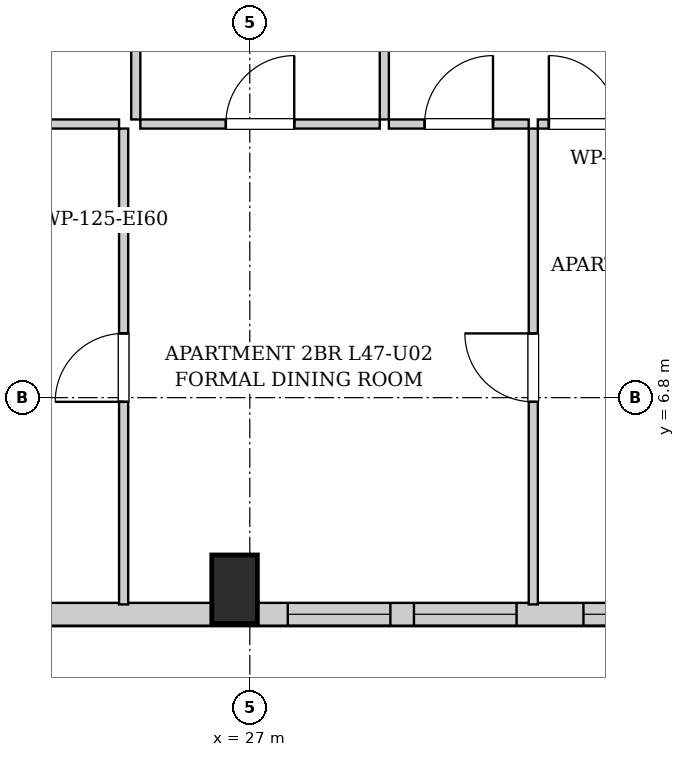
"""IFC4 building model, lengths in metres.
Left out: names, types, materials, properties, quantities, classifications, styles, units other than length and angle.
Written with IfcOpenShell. Run it as: python <this file> out.ifc"""

import sys

from ifc_helpers import new_model, si_unit, direction, frame, frame_2d, origin, origin_2d, place, context, subcontext, project, spatial, rectangle, extrude, element, fill, save


model = new_model("IFC4")
c1 = context("Model", 3, precision=1e-05, world=origin(), true_north=direction((0.0, 1.0)))
c2 = subcontext(c1, "Body", "Model", "MODEL_VIEW")
j1 = project(units=[si_unit("LENGTHUNIT", "METRE"), si_unit("PLANEANGLEUNIT", "RADIAN")], contexts=[c1])
p1 = place(None, origin())
s1 = spatial("IfcSite", under=j1, at=p1, CompositionType="ELEMENT")
p2 = place(p1, origin())
s2 = spatial("IfcBuilding", under=s1, at=p2, CompositionType="ELEMENT")
p3 = place(p2, frame((0.0, 0.0, 163.4)))
s3 = spatial("IfcBuildingStorey", under=s2, at=p3, CompositionType="ELEMENT", Elevation=163.4)
p4 = place(p3, frame((26.8, 4.28, 0.0), z_axis=(0.0, 0.0, 1.0), x_axis=(1.0, 0.0, 0.0)))
e1 = element("IfcColumn", 1, at=p4, inside=s3, PredefinedType="COLUMN", context=c2, shape_type="SweptSolid", body=[
    extrude(rectangle(XDim=0.6, YDim=0.9, at=origin_2d()), origin(), (0.0, 0.0, 1.0), 3.25),
])
p5 = place(p3, frame((37.8, 3.95, 0.0), z_axis=(0.0, 0.0, 1.0), x_axis=(-1.0, 0.0, 0.0)))
e2 = element("IfcWall", 2, at=p5, inside=s3, PredefinedType="SOLIDWALL", context=c2, shape_type="SweptSolid", body=[
    extrude(rectangle(XDim=20.15, YDim=0.3, at=frame_2d((10.075, 0.0))), origin(), (0.0, 0.0, 1.0), 2.99),
])
p6 = place(p5, frame((15.3, 0.0, 0.55)))
e3 = element("IfcOpeningElement", 3, at=p6, cuts=e2, PredefinedType="OPENING", context=c2, shape_type="SweptSolid", body=[
    extrude(rectangle(XDim=1.35, YDim=1.2, at=frame_2d((0.675, 0.6))), frame((0.0, 0.16, 0.0), z_axis=(0.0, -1.0, 0.0), x_axis=(1.0, 0.0, 0.0)), (0.0, 0.0, 1.0), 0.32),
])
p7 = place(p5, frame((16.91, 0.0, 0.55)))
e4 = element("IfcOpeningElement", 4, at=p7, cuts=e2, PredefinedType="OPENING", context=c2, shape_type="SweptSolid", body=[
    extrude(rectangle(XDim=1.35, YDim=1.2, at=frame_2d((0.675, 0.6))), frame((0.0, 0.16, 0.0), z_axis=(0.0, -1.0, 0.0), x_axis=(1.0, 0.0, 0.0)), (0.0, 0.0, 1.0), 0.32),
])
p8 = place(p5, frame((8.95, 0.0, 0.55)))
e5 = element("IfcOpeningElement", 5, at=p8, cuts=e2, PredefinedType="OPENING", context=c2, shape_type="SweptSolid", body=[
    extrude(rectangle(XDim=1.35, YDim=1.2, at=frame_2d((0.675, 0.6))), frame((0.0, 0.16, 0.0), z_axis=(0.0, -1.0, 0.0), x_axis=(1.0, 0.0, 0.0)), (0.0, 0.0, 1.0), 0.32),
])
p9 = place(p5, frame((7.29, 0.0, 0.55)))
e6 = element("IfcOpeningElement", 6, at=p9, cuts=e2, PredefinedType="OPENING", context=c2, shape_type="SweptSolid", body=[
    extrude(rectangle(XDim=1.35, YDim=1.2, at=frame_2d((0.675, 0.6))), frame((0.0, 0.16, 0.0), z_axis=(0.0, -1.0, 0.0), x_axis=(1.0, 0.0, 0.0)), (0.0, 0.0, 1.0), 0.32),
])
p10 = place(p5, frame((5.06, 0.0, 0.55)))
e7 = element("IfcOpeningElement", 7, at=p10, cuts=e2, PredefinedType="OPENING", context=c2, shape_type="SweptSolid", body=[
    extrude(rectangle(XDim=1.35, YDim=1.2, at=frame_2d((0.675, 0.6))), frame((0.0, 0.16, 0.0), z_axis=(0.0, -1.0, 0.0), x_axis=(1.0, 0.0, 0.0)), (0.0, 0.0, 1.0), 0.32),
])
p11 = place(p3, frame((25.5, 10.46, 0.0), z_axis=(0.0, 0.0, 1.0), x_axis=(0.0, 1.0, 0.0)))
e8 = element("IfcWall", 8, at=p11, inside=s3, PredefinedType="PARTITIONING", context=c2, shape_type="SweptSolid", body=[
    extrude(rectangle(XDim=2.85, YDim=0.12, at=frame_2d((1.425, 0.0))), origin(), (0.0, 0.0, 1.0), 2.99),
])
p12 = place(p11, frame((0.975, 0.0, 0.0)))
e9 = element("IfcOpeningElement", 9, at=p12, cuts=e8, PredefinedType="OPENING", context=c2, shape_type="SweptSolid", body=[
    extrude(rectangle(XDim=0.9, YDim=2.05, at=frame_2d((0.45, 1.025))), frame((0.0, 0.07, 0.0), z_axis=(0.0, -1.0, 0.0), x_axis=(1.0, 0.0, 0.0)), (0.0, 0.0, 1.0), 0.14),
])
p13 = place(p3, frame((21.0, 10.4, 0.0), z_axis=(0.0, 0.0, 1.0), x_axis=(1.0, 0.0, 0.0)))
e10 = element("IfcWall", 10, at=p13, inside=s3, PredefinedType="PARTITIONING", context=c2, shape_type="SweptSolid", body=[
    extrude(rectangle(XDim=4.28, YDim=0.12, at=frame_2d((2.14, 0.0))), origin(), (0.0, 0.0, 1.0), 2.99),
])
p14 = place(p13, frame((1.69, 0.0, 0.0)))
e11 = element("IfcOpeningElement", 11, at=p14, cuts=e10, PredefinedType="OPENING", context=c2, shape_type="SweptSolid", body=[
    extrude(rectangle(XDim=0.9, YDim=2.05, at=frame_2d((0.45, 1.025))), frame((0.0, 0.07, 0.0), z_axis=(0.0, -1.0, 0.0), x_axis=(1.0, 0.0, 0.0)), (0.0, 0.0, 1.0), 0.14),
])
p15 = place(p3, frame((28.77, 10.46, 0.0), z_axis=(0.0, 0.0, 1.0), x_axis=(0.0, 1.0, 0.0)))
e12 = element("IfcWall", 12, at=p15, inside=s3, PredefinedType="PARTITIONING", context=c2, shape_type="SweptSolid", body=[
    extrude(rectangle(XDim=2.85, YDim=0.12, at=frame_2d((1.425, 0.0))), origin(), (0.0, 0.0, 1.0), 2.99),
])
p16 = place(p15, frame((0.975, 0.0, 0.0)))
e13 = element("IfcOpeningElement", 13, at=p16, cuts=e12, PredefinedType="OPENING", context=c2, shape_type="SweptSolid", body=[
    extrude(rectangle(XDim=0.9, YDim=2.05, at=frame_2d((0.45, 1.025))), frame((0.0, 0.07, 0.0), z_axis=(0.0, -1.0, 0.0), x_axis=(1.0, 0.0, 0.0)), (0.0, 0.0, 1.0), 0.14),
])
p17 = place(p3, frame((25.56, 10.4, 0.0), z_axis=(0.0, 0.0, 1.0), x_axis=(1.0, 0.0, 0.0)))
e14 = element("IfcWall", 14, at=p17, inside=s3, PredefinedType="PARTITIONING", context=c2, shape_type="SweptSolid", body=[
    extrude(rectangle(XDim=3.15, YDim=0.12, at=frame_2d((1.575, 0.0))), origin(), (0.0, 0.0, 1.0), 2.99),
])
p18 = place(p17, frame((1.125, 0.0, 0.0)))
e15 = element("IfcOpeningElement", 15, at=p18, cuts=e14, PredefinedType="OPENING", context=c2, shape_type="SweptSolid", body=[
    extrude(rectangle(XDim=0.9, YDim=2.05, at=frame_2d((0.45, 1.025))), frame((0.0, 0.07, 0.0), z_axis=(0.0, -1.0, 0.0), x_axis=(1.0, 0.0, 0.0)), (0.0, 0.0, 1.0), 0.14),
])
p19 = place(p3, frame((28.83, 10.4, 0.0), z_axis=(0.0, 0.0, 1.0), x_axis=(1.0, 0.0, 0.0)))
e16 = element("IfcWall", 16, at=p19, inside=s3, PredefinedType="PARTITIONING", context=c2, shape_type="SweptSolid", body=[
    extrude(rectangle(XDim=1.84, YDim=0.12, at=frame_2d((0.92, 0.0))), origin(), (0.0, 0.0, 1.0), 2.99),
])
p20 = place(p19, frame((0.47, 0.0, 0.0)))
e17 = element("IfcOpeningElement", 17, at=p20, cuts=e16, PredefinedType="OPENING", context=c2, shape_type="SweptSolid", body=[
    extrude(rectangle(XDim=0.9, YDim=2.05, at=frame_2d((0.45, 1.025))), frame((0.0, 0.07, 0.0), z_axis=(0.0, -1.0, 0.0), x_axis=(1.0, 0.0, 0.0)), (0.0, 0.0, 1.0), 0.14),
])
p21 = place(p3, frame((30.79, 10.4, 0.0), z_axis=(0.0, 0.0, 1.0), x_axis=(1.0, 0.0, 0.0)))
e18 = element("IfcWall", 18, at=p21, inside=s3, PredefinedType="PARTITIONING", context=c2, shape_type="SweptSolid", body=[
    extrude(rectangle(XDim=1.19, YDim=0.12, at=frame_2d((0.595, 0.0))), origin(), (0.0, 0.0, 1.0), 2.99),
])
p22 = place(p21, frame((0.145, 0.0, 0.0)))
e19 = element("IfcOpeningElement", 19, at=p22, cuts=e18, PredefinedType="OPENING", context=c2, shape_type="SweptSolid", body=[
    extrude(rectangle(XDim=0.9, YDim=2.05, at=frame_2d((0.45, 1.025))), frame((0.0, 0.07, 0.0), z_axis=(0.0, -1.0, 0.0), x_axis=(1.0, 0.0, 0.0)), (0.0, 0.0, 1.0), 0.14),
])
p23 = place(p3, frame((25.34, 4.08, 0.0), z_axis=(0.0, 0.0, 1.0), x_axis=(0.0, 1.0, 0.0)))
e20 = element("IfcWall", 20, at=p23, inside=s3, PredefinedType="PARTITIONING", context=c2, shape_type="SweptSolid", body=[
    extrude(rectangle(XDim=6.26, YDim=0.12, at=frame_2d((3.13, 0.0))), origin(), (0.0, 0.0, 1.0), 2.99),
])
p24 = place(p23, frame((2.665, 0.0, 0.0)))
e21 = element("IfcOpeningElement", 21, at=p24, cuts=e20, PredefinedType="OPENING", context=c2, shape_type="SweptSolid", body=[
    extrude(rectangle(XDim=0.9, YDim=2.05, at=frame_2d((0.45, 1.025))), frame((0.0, 0.07, 0.0), z_axis=(0.0, -1.0, 0.0), x_axis=(1.0, 0.0, 0.0)), (0.0, 0.0, 1.0), 0.14),
])
p25 = place(p3, frame((30.73, 4.08, 0.0), z_axis=(0.0, 0.0, 1.0), x_axis=(0.0, 1.0, 0.0)))
e22 = element("IfcWall", 22, at=p25, inside=s3, PredefinedType="PARTITIONING", context=c2, shape_type="SweptSolid", body=[
    extrude(rectangle(XDim=6.26, YDim=0.12, at=frame_2d((3.13, 0.0))), origin(), (0.0, 0.0, 1.0), 2.99),
])
p26 = place(p25, frame((2.665, 0.0, 0.0)))
e23 = element("IfcOpeningElement", 23, at=p26, cuts=e22, PredefinedType="OPENING", context=c2, shape_type="SweptSolid", body=[
    extrude(rectangle(XDim=0.9, YDim=2.05, at=frame_2d((0.45, 1.025))), frame((0.0, 0.07, 0.0), z_axis=(0.0, -1.0, 0.0), x_axis=(1.0, 0.0, 0.0)), (0.0, 0.0, 1.0), 0.14),
])
p27 = place(p18, origin())
e24 = element("IfcDoor", 24, at=p27, inside=s3, OperationType="SINGLE_SWING_RIGHT", PredefinedType="DOOR", context=c2, shape_type="SweptSolid", body=[
    extrude(rectangle(XDim=0.9, YDim=2.05, at=frame_2d((0.45, 1.025))), frame((0.0, 0.025, 0.0), z_axis=(0.0, -1.0, 0.0), x_axis=(1.0, 0.0, 0.0)), (0.0, 0.0, 1.0), 0.05),
])
fill(e15, e24)
p28 = place(p20, origin())
e25 = element("IfcDoor", 25, at=p28, inside=s3, OperationType="SINGLE_SWING_RIGHT", PredefinedType="DOOR", context=c2, shape_type="SweptSolid", body=[
    extrude(rectangle(XDim=0.9, YDim=2.05, at=frame_2d((0.45, 1.025))), frame((0.0, 0.025, 0.0), z_axis=(0.0, -1.0, 0.0), x_axis=(1.0, 0.0, 0.0)), (0.0, 0.0, 1.0), 0.05),
])
fill(e17, e25)
p29 = place(p22, origin())
e26 = element("IfcDoor", 26, at=p29, inside=s3, OperationType="SINGLE_SWING_LEFT", PredefinedType="DOOR", context=c2, shape_type="SweptSolid", body=[
    extrude(rectangle(XDim=0.9, YDim=2.05, at=frame_2d((0.45, 1.025))), frame((0.0, 0.025, 0.0), z_axis=(0.0, -1.0, 0.0), x_axis=(1.0, 0.0, 0.0)), (0.0, 0.0, 1.0), 0.05),
])
fill(e19, e26)
p30 = place(p24, origin())
e27 = element("IfcDoor", 27, at=p30, inside=s3, OperationType="SINGLE_SWING_LEFT", PredefinedType="DOOR", context=c2, shape_type="SweptSolid", body=[
    extrude(rectangle(XDim=0.9, YDim=2.05, at=frame_2d((0.45, 1.025))), frame((0.0, 0.025, 0.0), z_axis=(0.0, -1.0, 0.0), x_axis=(1.0, 0.0, 0.0)), (0.0, 0.0, 1.0), 0.05),
])
fill(e21, e27)
p31 = place(p26, origin())
e28 = element("IfcDoor", 28, at=p31, inside=s3, OperationType="SINGLE_SWING_RIGHT", PredefinedType="DOOR", context=c2, shape_type="SweptSolid", body=[
    extrude(rectangle(XDim=0.9, YDim=2.05, at=frame_2d((0.45, 1.025))), frame((0.0, 0.025, 0.0), z_axis=(0.0, -1.0, 0.0), x_axis=(1.0, 0.0, 0.0)), (0.0, 0.0, 1.0), 0.05),
])
fill(e23, e28)
p32 = place(p8, origin())
e29 = element("IfcWindow", 29, at=p32, inside=s3, PartitioningType="SINGLE_PANEL", PredefinedType="WINDOW", context=c2, shape_type="SweptSolid", body=[
    extrude(rectangle(XDim=1.35, YDim=1.2, at=frame_2d((0.675, 0.6))), frame((0.0, 0.03, 0.0), z_axis=(0.0, -1.0, 0.0), x_axis=(1.0, 0.0, 0.0)), (0.0, 0.0, 1.0), 0.06),
])
fill(e5, e29)
p33 = place(p9, origin())
e30 = element("IfcWindow", 30, at=p33, inside=s3, PartitioningType="SINGLE_PANEL", PredefinedType="WINDOW", context=c2, shape_type="SweptSolid", body=[
    extrude(rectangle(XDim=1.35, YDim=1.2, at=frame_2d((0.675, 0.6))), frame((0.0, 0.03, 0.0), z_axis=(0.0, -1.0, 0.0), x_axis=(1.0, 0.0, 0.0)), (0.0, 0.0, 1.0), 0.06),
])
fill(e6, e30)
p34 = place(p10, origin())
e31 = element("IfcWindow", 31, at=p34, inside=s3, PartitioningType="SINGLE_PANEL", PredefinedType="WINDOW", context=c2, shape_type="SweptSolid", body=[
    extrude(rectangle(XDim=1.35, YDim=1.2, at=frame_2d((0.675, 0.6))), frame((0.0, 0.03, 0.0), z_axis=(0.0, -1.0, 0.0), x_axis=(1.0, 0.0, 0.0)), (0.0, 0.0, 1.0), 0.06),
])
fill(e7, e31)
save(model, sys.argv[1])
